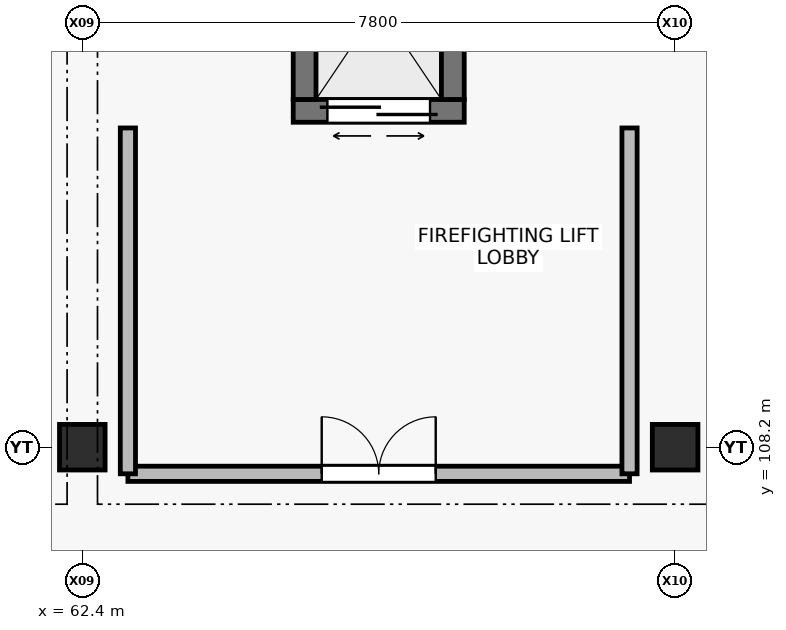
"""IFC4 building model, lengths in metres.
Left out: names, types, materials, properties, quantities, classifications, styles, units other than length and angle.
Written with IfcOpenShell. Run it as: python <this file> out.ifc"""

import sys

from ifc_helpers import new_model, si_unit, direction, frame, frame_2d, origin, origin_2d, place, context, subcontext, project, spatial, rectangle, extrude, element, fill, save


model = new_model("IFC4")
c1 = context("Model", 3, precision=1e-05, world=origin(), true_north=direction((0.0, 1.0)))
c2 = subcontext(c1, "Body", "Model", "MODEL_VIEW")
j1 = project(units=[si_unit("LENGTHUNIT", "METRE"), si_unit("PLANEANGLEUNIT", "RADIAN")], contexts=[c1])
p1 = place(None, origin())
s1 = spatial("IfcSite", under=j1, at=p1, CompositionType="ELEMENT")
p2 = place(p1, origin())
s2 = spatial("IfcBuilding", under=s1, at=p2, CompositionType="ELEMENT")
p3 = place(p2, frame((0.0, 0.0, 4.8)))
s3 = spatial("IfcBuildingStorey", under=s2, at=p3, CompositionType="ELEMENT", Elevation=4.8)
for number, where, z_axis, x_axis in (
    (1, (62.4, 108.2, 0.0), (0.0, 0.0, 1.0), (1.0, 0.0, 0.0)),
    (2, (70.2, 108.2, 0.0), (0.0, 0.0, 1.0), (1.0, 0.0, 0.0)),
):
    element("IfcColumn", number, at=place(p3, frame(where, z_axis=z_axis, x_axis=x_axis)), inside=s3, PredefinedType="COLUMN", context=c2, shape_type="SweptSolid", body=[
        extrude(rectangle(XDim=0.6, YDim=0.6, at=origin_2d()), origin(), (0.0, 0.0, 1.0), 4.8),
    ])
p4 = place(p3, frame((65.175, 112.625, 0.0), z_axis=(0.0, 0.0, 1.0), x_axis=(1.0, 0.0, 0.0)))
e3 = element("IfcWall", 3, at=p4, inside=s3, PredefinedType="SHEAR", context=c2, shape_type="SweptSolid", body=[
    extrude(rectangle(XDim=2.25, YDim=0.3, at=frame_2d((1.125, 0.0))), origin(), (0.0, 0.0, 1.0), 4.54),
])
p5 = place(p4, frame((0.45, 0.0, 0.0)))
e4 = element("IfcOpeningElement", 4, at=p5, cuts=e3, PredefinedType="OPENING", context=c2, shape_type="SweptSolid", body=[
    extrude(rectangle(XDim=1.35, YDim=2.3, at=frame_2d((0.675, 1.15))), frame((0.0, 0.16, 0.0), z_axis=(0.0, -1.0, 0.0), x_axis=(1.0, 0.0, 0.0)), (0.0, 0.0, 1.0), 0.32),
])
for number, where, z_axis, x_axis in (
    (5, (65.325, 115.225, 0.0), (0.0, 0.0, 1.0), (0.0, -1.0, 0.0)),
    (6, (67.275, 112.775, 0.0), (0.0, 0.0, 1.0), (0.0, 1.0, 0.0)),
):
    element("IfcWall", number, at=place(p3, frame(where, z_axis=z_axis, x_axis=x_axis)), inside=s3, PredefinedType="SHEAR", context=c2, shape_type="SweptSolid", body=[
        extrude(rectangle(XDim=2.45, YDim=0.3, at=frame_2d((1.225, 0.0))), origin(), (0.0, 0.0, 1.0), 4.54),
    ])
p6 = place(p3, frame((63.0, 107.85, 0.0), z_axis=(0.0, 0.0, 1.0), x_axis=(1.0, 0.0, 0.0)))
e7 = element("IfcWall", 7, at=p6, inside=s3, PredefinedType="SOLIDWALL", context=c2, shape_type="SweptSolid", body=[
    extrude(rectangle(XDim=6.6, YDim=0.2, at=frame_2d((3.3, 0.0))), origin(), (0.0, 0.0, 1.0), 4.04),
])
p7 = place(p6, frame((2.55, 0.0, 0.0)))
e8 = element("IfcOpeningElement", 8, at=p7, cuts=e7, PredefinedType="OPENING", context=c2, shape_type="SweptSolid", body=[
    extrude(rectangle(XDim=1.5, YDim=2.2, at=frame_2d((0.75, 1.1))), frame((0.0, 0.11, 0.0), z_axis=(0.0, -1.0, 0.0), x_axis=(1.0, 0.0, 0.0)), (0.0, 0.0, 1.0), 0.22),
])
for number, where, z_axis, x_axis in (
    (9, (63.0, 112.4, 0.0), (0.0, 0.0, 1.0), (0.0, -1.0, 0.0)),
    (10, (69.6, 107.85, 0.0), (0.0, 0.0, 1.0), (0.0, 1.0, 0.0)),
):
    element("IfcWall", number, at=place(p3, frame(where, z_axis=z_axis, x_axis=x_axis)), inside=s3, PredefinedType="SOLIDWALL", context=c2, shape_type="SweptSolid", body=[
        extrude(rectangle(XDim=4.55, YDim=0.2, at=frame_2d((2.275, 0.0))), origin(), (0.0, 0.0, 1.0), 4.54),
    ])
p8 = place(p5, origin())
e11 = element("IfcDoor", 11, at=p8, inside=s3, OperationType="DOUBLE_DOOR_SLIDING", PredefinedType="DOOR", context=c2, shape_type="SweptSolid", body=[
    extrude(rectangle(XDim=1.35, YDim=2.3, at=frame_2d((0.675, 1.15))), frame((0.0, 0.025, 0.0), z_axis=(0.0, -1.0, 0.0), x_axis=(1.0, 0.0, 0.0)), (0.0, 0.0, 1.0), 0.05),
])
fill(e4, e11)
p9 = place(p7, origin())
e12 = element("IfcDoor", 12, at=p9, inside=s3, OperationType="DOUBLE_DOOR_SINGLE_SWING", PredefinedType="DOOR", context=c2, shape_type="SweptSolid", body=[
    extrude(rectangle(XDim=1.5, YDim=2.2, at=frame_2d((0.75, 1.1))), frame((0.0, 0.025, 0.0), z_axis=(0.0, -1.0, 0.0), x_axis=(1.0, 0.0, 0.0)), (0.0, 0.0, 1.0), 0.05),
])
fill(e8, e12)
save(model, sys.argv[1])
